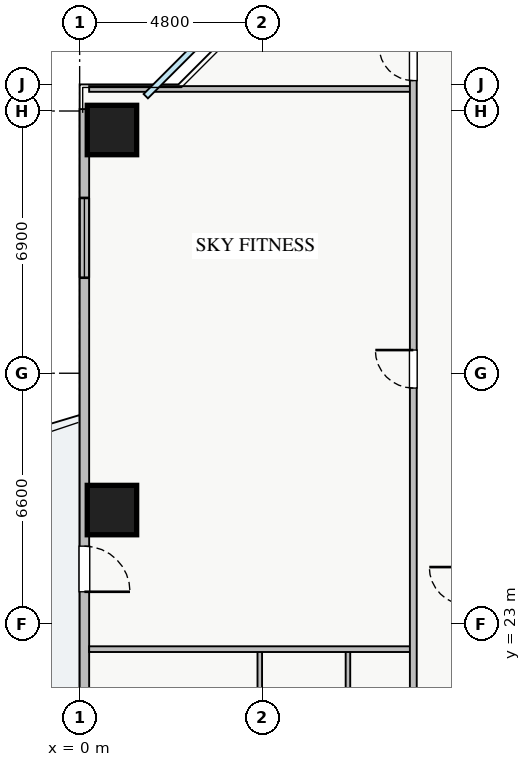
"""IFC4 building model, lengths in metres.
Left out: names, types, materials, properties, quantities, classifications, styles, units other than length and angle.
Written with IfcOpenShell. Run it as: python <this file> out.ifc"""

import sys

from ifc_helpers import new_model, si_unit, direction, frame, frame_2d, origin, origin_2d, place, context, subcontext, project, spatial, rectangle, extrude, source, transform, mapped, element, fill, save


model = new_model("IFC4")
c1 = context("Model", 3, precision=1e-05, world=origin(), true_north=direction((0.0, 1.0)))
c2 = subcontext(c1, "Body", "Model", "MODEL_VIEW")
j1 = project(units=[si_unit("LENGTHUNIT", "METRE"), si_unit("PLANEANGLEUNIT", "RADIAN")], contexts=[c1])
p1 = place(None, origin())
s1 = spatial("IfcSite", under=j1, at=p1, CompositionType="ELEMENT")
p2 = place(p1, origin())
s2 = spatial("IfcBuilding", under=s1, at=p2, CompositionType="ELEMENT")
p3 = place(p2, frame((0.0, 0.0, 26.25)))
s3 = spatial("IfcBuildingStorey", under=s2, at=p3, CompositionType="ELEMENT", Elevation=26.25)
m1 = source(origin(), c2, "Body", "SweptSolid", [
    extrude(rectangle(XDim=1.3, YDim=1.3, at=origin_2d()), origin(), (0.0, 0.0, 1.0), 3.25),
])
for number, where, z_axis, x_axis in (
    (1, (0.85, 36.0, 0.0), (0.0, 0.0, 1.0), (1.0, 0.0, 0.0)),
    (2, (0.85, 26.0, 0.0), (0.0, 0.0, 1.0), (1.0, 0.0, 0.0)),
):
    element("IfcColumn", number, at=place(p3, frame(where, z_axis=z_axis, x_axis=x_axis)), inside=s3, PredefinedType="COLUMN", context=c2, shape_type="MappedRepresentation", body=[
        mapped(m1, transform((0.0, 0.0, 0.0), x_axis=(1.0, 0.0, 0.0), y_axis=(0.0, 1.0, 0.0), z_axis=(0.0, 0.0, 1.0), scale=1.0)),
    ])
p4 = place(p3, frame((0.125, 9.45, 0.0), z_axis=(0.0, 0.0, 1.0), x_axis=(0.0, 1.0, 0.0)))
e3 = element("IfcWall", 3, at=p4, inside=s3, PredefinedType="STANDARD", context=c2, shape_type="SweptSolid", body=[
    extrude(rectangle(XDim=27.1, YDim=0.25, at=frame_2d((13.55, 0.0))), origin(), (0.0, 0.0, 1.0), 2.61),
])
p5 = place(p4, frame((14.4, 0.0, 0.0)))
e4 = element("IfcOpeningElement", 4, at=p5, cuts=e3, PredefinedType="OPENING", context=c2, shape_type="SweptSolid", body=[
    extrude(rectangle(XDim=1.2, YDim=2.1, at=frame_2d((0.6, 1.05))), frame((0.0, 0.135, 0.0), z_axis=(0.0, -1.0, 0.0), x_axis=(1.0, 0.0, 0.0)), (0.0, 0.0, 1.0), 0.27),
])
p6 = place(p4, frame((2.188, 0.0, 0.9)))
e5 = element("IfcOpeningElement", 5, at=p6, cuts=e3, PredefinedType="OPENING", context=c2, shape_type="SweptSolid", body=[
    extrude(rectangle(XDim=2.4, YDim=1.48, at=frame_2d((1.2, 0.74))), frame((0.0, 0.135, 0.0), z_axis=(0.0, -1.0, 0.0), x_axis=(1.0, 0.0, 0.0)), (0.0, 0.0, 1.0), 0.27),
])
p7 = place(p4, frame((22.663, 0.0, 0.9)))
e6 = element("IfcOpeningElement", 6, at=p7, cuts=e3, PredefinedType="OPENING", context=c2, shape_type="SweptSolid", body=[
    extrude(rectangle(XDim=2.1, YDim=1.48, at=frame_2d((1.05, 0.74))), frame((0.0, 0.135, 0.0), z_axis=(0.0, -1.0, 0.0), x_axis=(1.0, 0.0, 0.0)), (0.0, 0.0, 1.0), 0.27),
])
p8 = place(p4, frame((5.95, 0.0, 0.9)))
e7 = element("IfcOpeningElement", 7, at=p8, cuts=e3, PredefinedType="OPENING", context=c2, shape_type="SweptSolid", body=[
    extrude(rectangle(XDim=0.9, YDim=1.2, at=frame_2d((0.45, 0.6))), frame((0.0, 0.135, 0.0), z_axis=(0.0, -1.0, 0.0), x_axis=(1.0, 0.0, 0.0)), (0.0, 0.0, 1.0), 0.27),
])
p9 = place(p3, frame((0.25, 37.08, 0.0), z_axis=(0.0, 0.0, 1.0), x_axis=(1.0, 0.0, 0.0)))
e8 = element("IfcWall", 8, at=p9, inside=s3, PredefinedType="PARTITIONING", context=c2, shape_type="SweptSolid", body=[
    extrude(rectangle(XDim=8.53, YDim=0.15, at=frame_2d((4.265, 0.0))), origin(), (0.0, 0.0, 1.0), 3.07),
])
for number, where, z_axis, x_axis in (
    (9, (4.74, 15.18, 0.0), (0.0, 0.0, 1.0), (0.0, 1.0, 0.0)),
    (10, (7.06, 15.18, 0.0), (0.0, 0.0, 1.0), (0.0, 1.0, 0.0)),
):
    element("IfcWall", number, at=place(p3, frame(where, z_axis=z_axis, x_axis=x_axis)), inside=s3, PredefinedType="PLUMBINGWALL", context=c2, shape_type="SweptSolid", body=[
        extrude(rectangle(XDim=7.16, YDim=0.12, at=frame_2d((3.58, 0.0))), origin(), (0.0, 0.0, 1.0), 3.07),
    ])
p10 = place(p3, frame((0.25, 22.34, 0.0), z_axis=(0.0, 0.0, 1.0), x_axis=(1.0, 0.0, 0.0)))
e11 = element("IfcWall", 11, at=p10, inside=s3, PredefinedType="PARTITIONING", context=c2, shape_type="SweptSolid", body=[
    extrude(rectangle(XDim=8.53, YDim=0.15, at=frame_2d((4.265, 0.0))), origin(), (0.0, 0.0, 1.0), 3.07),
])
p11 = place(p3, frame((8.78, 7.21, 0.0), z_axis=(0.0, 0.0, 1.0), x_axis=(0.0, 1.0, 0.0)))
e12 = element("IfcWall", 12, at=p11, inside=s3, PredefinedType="PARTITIONING", context=c2, shape_type="SweptSolid", body=[
    extrude(rectangle(XDim=31.23, YDim=0.18, at=frame_2d((15.615, 0.0))), origin(), (0.0, 0.0, 1.0), 3.07),
])
p12 = place(p11, frame((30.09, 0.0, 0.0)))
e13 = element("IfcOpeningElement", 13, at=p12, cuts=e12, PredefinedType="OPENING", context=c2, shape_type="SweptSolid", body=[
    extrude(rectangle(XDim=0.9, YDim=2.05, at=frame_2d((0.45, 1.025))), frame((0.0, 0.1, 0.0), z_axis=(0.0, -1.0, 0.0), x_axis=(1.0, 0.0, 0.0)), (0.0, 0.0, 1.0), 0.2),
])
p13 = place(p11, frame((0.24, 0.0, 0.0)))
e14 = element("IfcOpeningElement", 14, at=p13, cuts=e12, PredefinedType="OPENING", context=c2, shape_type="SweptSolid", body=[
    extrude(rectangle(XDim=0.9, YDim=2.05, at=frame_2d((0.45, 1.025))), frame((0.0, 0.1, 0.0), z_axis=(0.0, -1.0, 0.0), x_axis=(1.0, 0.0, 0.0)), (0.0, 0.0, 1.0), 0.2),
])
p14 = place(p11, frame((3.975, 0.0, 0.0)))
e15 = element("IfcOpeningElement", 15, at=p14, cuts=e12, PredefinedType="OPENING", context=c2, shape_type="SweptSolid", body=[
    extrude(rectangle(XDim=1.0, YDim=2.05, at=frame_2d((0.5, 1.025))), frame((0.0, 0.1, 0.0), z_axis=(0.0, -1.0, 0.0), x_axis=(1.0, 0.0, 0.0)), (0.0, 0.0, 1.0), 0.2),
])
p15 = place(p11, frame((22.0, 0.0, 0.0)))
e16 = element("IfcOpeningElement", 16, at=p15, cuts=e12, PredefinedType="OPENING", context=c2, shape_type="SweptSolid", body=[
    extrude(rectangle(XDim=1.0, YDim=2.05, at=frame_2d((0.5, 1.025))), frame((0.0, 0.1, 0.0), z_axis=(0.0, -1.0, 0.0), x_axis=(1.0, 0.0, 0.0)), (0.0, 0.0, 1.0), 0.2),
])
m2 = source(origin(), c2, "Body", "SweptSolid", [
    extrude(rectangle(XDim=1.2, YDim=2.1, at=frame_2d((0.6, 1.05))), frame((0.0, 0.025, 0.0), z_axis=(0.0, -1.0, 0.0), x_axis=(1.0, 0.0, 0.0)), (0.0, 0.0, 1.0), 0.05),
])
p16 = place(p5, frame((1.2, 0.0, 0.0), z_axis=(0.0, 0.0, 1.0), x_axis=(-1.0, 0.0, 0.0)))
e17 = element("IfcDoor", 17, at=p16, inside=s3, OperationType="SINGLE_SWING_LEFT", PredefinedType="DOOR", context=c2, shape_type="MappedRepresentation", body=[
    mapped(m2, transform((0.0, 0.0, 0.0), x_axis=(1.0, 0.0, 0.0), y_axis=(0.0, 1.0, 0.0), z_axis=(0.0, 0.0, 1.0), scale=1.0)),
])
fill(e4, e17)
m3 = source(origin(), c2, "Body", "SweptSolid", [
    extrude(rectangle(XDim=2.1, YDim=1.48, at=frame_2d((1.05, 0.74))), frame((0.0, 0.03, 0.0), z_axis=(0.0, -1.0, 0.0), x_axis=(1.0, 0.0, 0.0)), (0.0, 0.0, 1.0), 0.06),
])
p17 = place(p7, origin())
e18 = element("IfcWindow", 18, at=p17, inside=s3, PartitioningType="TRIPLE_PANEL_VERTICAL", PredefinedType="WINDOW", context=c2, shape_type="MappedRepresentation", body=[
    mapped(m3, transform((0.0, 0.0, 0.0), x_axis=(1.0, 0.0, 0.0), y_axis=(0.0, 1.0, 0.0), z_axis=(0.0, 0.0, 1.0), scale=1.0)),
])
fill(e6, e18)
m4 = source(origin(), c2, "Body", "SweptSolid", [
    extrude(rectangle(XDim=0.9, YDim=2.05, at=frame_2d((0.45, 1.025))), frame((0.0, 0.025, 0.0), z_axis=(0.0, -1.0, 0.0), x_axis=(1.0, 0.0, 0.0)), (0.0, 0.0, 1.0), 0.05),
])
p18 = place(p12, origin())
e19 = element("IfcDoor", 19, at=p18, inside=s3, OperationType="SINGLE_SWING_RIGHT", PredefinedType="DOOR", context=c2, shape_type="MappedRepresentation", body=[
    mapped(m4, transform((0.0, 0.0, 0.0), x_axis=(1.0, 0.0, 0.0), y_axis=(0.0, 1.0, 0.0), z_axis=(0.0, 0.0, 1.0), scale=1.0)),
])
fill(e13, e19)
m5 = source(origin(), c2, "Body", "SweptSolid", [
    extrude(rectangle(XDim=1.0, YDim=2.05, at=frame_2d((0.5, 1.025))), frame((0.0, 0.025, 0.0), z_axis=(0.0, -1.0, 0.0), x_axis=(1.0, 0.0, 0.0)), (0.0, 0.0, 1.0), 0.05),
])
p19 = place(p15, origin())
e20 = element("IfcDoor", 20, at=p19, inside=s3, OperationType="SINGLE_SWING_RIGHT", PredefinedType="DOOR", context=c2, shape_type="MappedRepresentation", body=[
    mapped(m5, transform((0.0, 0.0, 0.0), x_axis=(1.0, 0.0, 0.0), y_axis=(0.0, 1.0, 0.0), z_axis=(0.0, 0.0, 1.0), scale=1.0)),
])
fill(e16, e20)
save(model, sys.argv[1])
